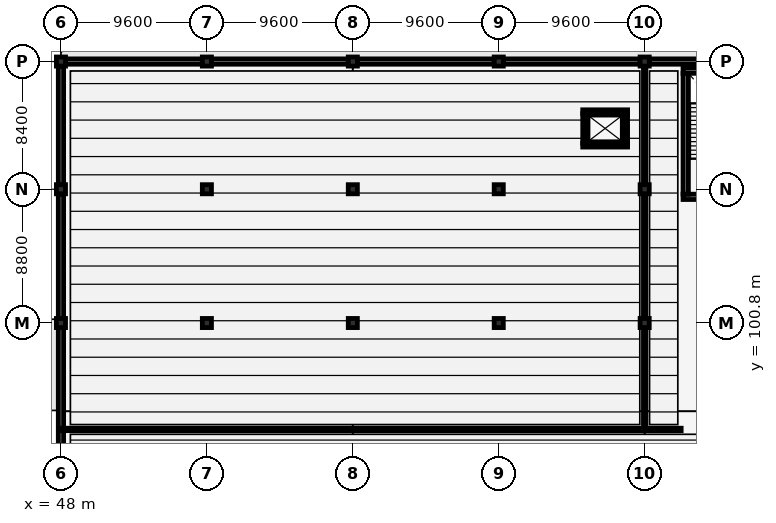
"""IFC4 building model, lengths in metres.
Left out: names, types, materials, properties, quantities, classifications, styles, units other than length and angle.
Written with IfcOpenShell. Run it as: python <this file> out.ifc"""

import sys

from ifc_helpers import new_model, si_unit, direction, frame, frame_2d, origin, origin_2d, place, context, subcontext, project, spatial, rectangle, extrude, element, fill, save


model = new_model("IFC4")
c1 = context("Model", 3, precision=1e-05, world=origin(), true_north=direction((0.0, 1.0)))
c2 = subcontext(c1, "Body", "Model", "MODEL_VIEW")
j1 = project(units=[si_unit("LENGTHUNIT", "METRE"), si_unit("PLANEANGLEUNIT", "RADIAN")], contexts=[c1])
p1 = place(None, origin())
s1 = spatial("IfcSite", under=j1, at=p1, CompositionType="ELEMENT")
p2 = place(p1, origin())
s2 = spatial("IfcBuilding", under=s1, at=p2, CompositionType="ELEMENT")
p3 = place(p2, origin())
s3 = spatial("IfcBuildingStorey", under=s2, at=p3, CompositionType="ELEMENT", Elevation=0.0)
for number, where, z_axis, x_axis in (
    (1, (48.0, 100.8, 0.0), (0.0, 0.0, 1.0), (1.0, 0.0, 0.0)),
    (2, (48.0, 109.6, 0.0), (0.0, 0.0, 1.0), (1.0, 0.0, 0.0)),
    (3, (48.0, 118.0, 0.0), (0.0, 0.0, 1.0), (1.0, 0.0, 0.0)),
    (4, (57.6, 100.8, 0.0), (0.0, 0.0, 1.0), (1.0, 0.0, 0.0)),
    (5, (57.6, 109.6, 0.0), (0.0, 0.0, 1.0), (1.0, 0.0, 0.0)),
    (6, (57.6, 118.0, 0.0), (0.0, 0.0, 1.0), (1.0, 0.0, 0.0)),
    (7, (67.2, 100.8, 0.0), (0.0, 0.0, 1.0), (1.0, 0.0, 0.0)),
    (8, (67.2, 109.6, 0.0), (0.0, 0.0, 1.0), (1.0, 0.0, 0.0)),
    (9, (67.2, 118.0, 0.0), (0.0, 0.0, 1.0), (1.0, 0.0, 0.0)),
    (10, (76.8, 100.8, 0.0), (0.0, 0.0, 1.0), (1.0, 0.0, 0.0)),
    (11, (76.8, 109.6, 0.0), (0.0, 0.0, 1.0), (1.0, 0.0, 0.0)),
    (12, (76.8, 118.0, 0.0), (0.0, 0.0, 1.0), (1.0, 0.0, 0.0)),
    (13, (86.4, 100.8, 0.0), (0.0, 0.0, 1.0), (1.0, 0.0, 0.0)),
    (14, (86.4, 109.6, 0.0), (0.0, 0.0, 1.0), (1.0, 0.0, 0.0)),
    (15, (86.4, 118.0, 0.0), (0.0, 0.0, 1.0), (1.0, 0.0, 0.0)),
):
    element("IfcColumn", number, at=place(p3, frame(where, z_axis=z_axis, x_axis=x_axis)), inside=s3, PredefinedType="COLUMN", context=c2, shape_type="SweptSolid", body=[
        extrude(rectangle(XDim=0.6, YDim=0.6, at=origin_2d()), origin(), (0.0, 0.0, 1.0), 4.8),
    ])
p4 = place(p3, frame((48.3, 118.0, 0.0), z_axis=(0.0, 0.0, 1.0), x_axis=(1.0, 0.0, 0.0)))
e16 = element("IfcWall", 16, at=p4, inside=s3, PredefinedType="SOLIDWALL", context=c2, shape_type="SweptSolid", body=[
    extrude(rectangle(XDim=9.0, YDim=0.35, at=frame_2d((4.5, 0.0))), origin(), (0.0, 0.0, 1.0), 4.1),
])
p5 = place(p4, frame((1.4, 0.0, 0.0)))
e17 = element("IfcOpeningElement", 17, at=p5, cuts=e16, PredefinedType="OPENING", context=c2, shape_type="SweptSolid", body=[
    extrude(rectangle(XDim=1.96, YDim=2.37, at=frame_2d((0.98, 1.185))), frame((0.0, 0.185, 0.0), z_axis=(0.0, -1.0, 0.0), x_axis=(1.0, 0.0, 0.0)), (0.0, 0.0, 1.0), 0.37),
])
p6 = place(p4, frame((5.4, 0.0, 1.1)))
e18 = element("IfcOpeningElement", 18, at=p6, cuts=e16, PredefinedType="OPENING", context=c2, shape_type="SweptSolid", body=[
    extrude(rectangle(XDim=1.5, YDim=1.6, at=frame_2d((0.75, 0.8))), frame((0.0, 0.185, 0.0), z_axis=(0.0, -1.0, 0.0), x_axis=(1.0, 0.0, 0.0)), (0.0, 0.0, 1.0), 0.37),
])
p7 = place(p3, frame((57.9, 118.0, 0.0), z_axis=(0.0, 0.0, 1.0), x_axis=(1.0, 0.0, 0.0)))
e19 = element("IfcWall", 19, at=p7, inside=s3, PredefinedType="SOLIDWALL", context=c2, shape_type="SweptSolid", body=[
    extrude(rectangle(XDim=9.0, YDim=0.35, at=frame_2d((4.5, 0.0))), origin(), (0.0, 0.0, 1.0), 4.1),
])
p8 = place(p7, frame((5.4, 0.0, 1.1)))
e20 = element("IfcOpeningElement", 20, at=p8, cuts=e19, PredefinedType="OPENING", context=c2, shape_type="SweptSolid", body=[
    extrude(rectangle(XDim=1.42, YDim=1.54, at=frame_2d((0.71, 0.77))), frame((0.0, 0.185, 0.0), z_axis=(0.0, -1.0, 0.0), x_axis=(1.0, 0.0, 0.0)), (0.0, 0.0, 1.0), 0.37),
])
p9 = place(p3, frame((67.5, 118.0, 0.0), z_axis=(0.0, 0.0, 1.0), x_axis=(1.0, 0.0, 0.0)))
e21 = element("IfcWall", 21, at=p9, inside=s3, PredefinedType="SOLIDWALL", context=c2, shape_type="SweptSolid", body=[
    extrude(rectangle(XDim=9.0, YDim=0.35, at=frame_2d((4.5, 0.0))), origin(), (0.0, 0.0, 1.0), 4.1),
])
p10 = place(p9, frame((1.4, 0.0, 0.0)))
e22 = element("IfcOpeningElement", 22, at=p10, cuts=e21, PredefinedType="OPENING", context=c2, shape_type="SweptSolid", body=[
    extrude(rectangle(XDim=1.88, YDim=2.31, at=frame_2d((0.94, 1.155))), frame((0.0, 0.185, 0.0), z_axis=(0.0, -1.0, 0.0), x_axis=(1.0, 0.0, 0.0)), (0.0, 0.0, 1.0), 0.37),
])
p11 = place(p9, frame((5.4, 0.0, 1.1)))
e23 = element("IfcOpeningElement", 23, at=p11, cuts=e21, PredefinedType="OPENING", context=c2, shape_type="SweptSolid", body=[
    extrude(rectangle(XDim=1.5, YDim=1.6, at=frame_2d((0.75, 0.8))), frame((0.0, 0.185, 0.0), z_axis=(0.0, -1.0, 0.0), x_axis=(1.0, 0.0, 0.0)), (0.0, 0.0, 1.0), 0.37),
])
p12 = place(p3, frame((77.1, 118.0, 0.0), z_axis=(0.0, 0.0, 1.0), x_axis=(1.0, 0.0, 0.0)))
e24 = element("IfcWall", 24, at=p12, inside=s3, PredefinedType="SOLIDWALL", context=c2, shape_type="SweptSolid", body=[
    extrude(rectangle(XDim=9.0, YDim=0.35, at=frame_2d((4.5, 0.0))), origin(), (0.0, 0.0, 1.0), 4.1),
])
p13 = place(p12, frame((5.4, 0.0, 1.1)))
e25 = element("IfcOpeningElement", 25, at=p13, cuts=e24, PredefinedType="OPENING", context=c2, shape_type="SweptSolid", body=[
    extrude(rectangle(XDim=1.42, YDim=1.54, at=frame_2d((0.71, 0.77))), frame((0.0, 0.185, 0.0), z_axis=(0.0, -1.0, 0.0), x_axis=(1.0, 0.0, 0.0)), (0.0, 0.0, 1.0), 0.37),
])
p14 = place(p3, frame((86.7, 118.0, 0.0), z_axis=(0.0, 0.0, 1.0), x_axis=(1.0, 0.0, 0.0)))
e26 = element("IfcWall", 26, at=p14, inside=s3, PredefinedType="SOLIDWALL", context=c2, shape_type="SweptSolid", body=[
    extrude(rectangle(XDim=9.0, YDim=0.35, at=frame_2d((4.5, 0.0))), origin(), (0.0, 0.0, 1.0), 4.1),
])
p15 = place(p14, frame((0.7, 0.0, 0.0)))
e27 = element("IfcOpeningElement", 27, at=p15, cuts=e26, PredefinedType="OPENING", context=c2, shape_type="SweptSolid", body=[
    extrude(rectangle(XDim=1.0, YDim=2.2, at=frame_2d((0.5, 1.1))), frame((0.0, 0.185, 0.0), z_axis=(0.0, -1.0, 0.0), x_axis=(1.0, 0.0, 0.0)), (0.0, 0.0, 1.0), 0.37),
])
p16 = place(p14, frame((5.4, 0.0, 1.1)))
e28 = element("IfcOpeningElement", 28, at=p16, cuts=e26, PredefinedType="OPENING", context=c2, shape_type="SweptSolid", body=[
    extrude(rectangle(XDim=1.5, YDim=1.6, at=frame_2d((0.75, 0.8))), frame((0.0, 0.185, 0.0), z_axis=(0.0, -1.0, 0.0), x_axis=(1.0, 0.0, 0.0)), (0.0, 0.0, 1.0), 0.37),
])
p17 = place(p3, frame((48.0, 91.5, 0.0), z_axis=(0.0, 0.0, 1.0), x_axis=(0.0, 1.0, 0.0)))
e29 = element("IfcWall", 29, at=p17, inside=s3, PredefinedType="SOLIDWALL", context=c2, shape_type="SweptSolid", body=[
    extrude(rectangle(XDim=9.0, YDim=0.35, at=frame_2d((4.5, 0.0))), origin(), (0.0, 0.0, 1.0), 4.1),
])
p18 = place(p17, frame((4.3, 0.0, 0.0)))
e30 = element("IfcOpeningElement", 30, at=p18, cuts=e29, PredefinedType="OPENING", context=c2, shape_type="SweptSolid", body=[
    extrude(rectangle(XDim=1.76, YDim=2.37, at=frame_2d((0.88, 1.185))), frame((0.0, 0.185, 0.0), z_axis=(0.0, -1.0, 0.0), x_axis=(1.0, 0.0, 0.0)), (0.0, 0.0, 1.0), 0.37),
])
p19 = place(p3, frame((48.0, 101.1, 0.0), z_axis=(0.0, 0.0, 1.0), x_axis=(0.0, 1.0, 0.0)))
e31 = element("IfcWall", 31, at=p19, inside=s3, PredefinedType="SOLIDWALL", context=c2, shape_type="SweptSolid", body=[
    extrude(rectangle(XDim=8.2, YDim=0.35, at=frame_2d((4.1, 0.0))), origin(), (0.0, 0.0, 1.0), 4.1),
])
p20 = place(p19, frame((2.8, 0.0, 1.15)))
e32 = element("IfcOpeningElement", 32, at=p20, cuts=e31, PredefinedType="OPENING", context=c2, shape_type="SweptSolid", body=[
    extrude(rectangle(XDim=1.38, YDim=1.51, at=frame_2d((0.69, 0.755))), frame((0.0, 0.185, 0.0), z_axis=(0.0, -1.0, 0.0), x_axis=(1.0, 0.0, 0.0)), (0.0, 0.0, 1.0), 0.37),
])
p21 = place(p3, frame((48.0, 109.9, 0.0), z_axis=(0.0, 0.0, 1.0), x_axis=(0.0, 1.0, 0.0)))
e33 = element("IfcWall", 33, at=p21, inside=s3, PredefinedType="SOLIDWALL", context=c2, shape_type="SweptSolid", body=[
    extrude(rectangle(XDim=7.8, YDim=0.35, at=frame_2d((3.9, 0.0))), origin(), (0.0, 0.0, 1.0), 4.1),
])
p22 = place(p21, frame((2.8, 0.0, 1.15)))
e34 = element("IfcOpeningElement", 34, at=p22, cuts=e33, PredefinedType="OPENING", context=c2, shape_type="SweptSolid", body=[
    extrude(rectangle(XDim=1.46, YDim=1.57, at=frame_2d((0.73, 0.785))), frame((0.0, 0.185, 0.0), z_axis=(0.0, -1.0, 0.0), x_axis=(1.0, 0.0, 0.0)), (0.0, 0.0, 1.0), 0.37),
])
p23 = place(p2, frame((0.0, 0.0, -4.2)))
s4 = spatial("IfcBuildingStorey", under=s2, at=p23, CompositionType="ELEMENT", Elevation=-4.2)
p24 = place(p23, frame((38.575, 95.0, 0.0), z_axis=(0.0, 0.0, 1.0), x_axis=(1.0, 0.0, 0.0)))
e35 = element("IfcWall", 35, at=p24, inside=s4, PredefinedType="SOLIDWALL", context=c2, shape_type="SweptSolid", body=[
    extrude(rectangle(XDim=9.25, YDim=0.4, at=frame_2d((4.625, 0.0))), origin(), (0.0, 0.0, 1.0), 9.0),
])
for number, where, z_axis, x_axis in (
    (36, (94.575, 109.1, 0.0), (0.0, 0.0, 1.0), (-1.0, 0.0, 0.0)),
    (37, (88.925, 117.4, 0.0), (0.0, 0.0, 1.0), (1.0, 0.0, 0.0)),
):
    element("IfcWall", number, at=place(p3, frame(where, z_axis=z_axis, x_axis=x_axis)), inside=s3, PredefinedType="SHEAR", context=c2, shape_type="SweptSolid", body=[
        extrude(rectangle(XDim=5.65, YDim=0.35, at=frame_2d((2.825, 0.0))), origin(), (0.0, 0.0, 1.0), 4.55),
    ])
p25 = place(p3, frame((89.1, 109.275, 0.0), z_axis=(0.0, 0.0, 1.0), x_axis=(0.0, 1.0, 0.0)))
e38 = element("IfcWall", 38, at=p25, inside=s3, PredefinedType="SHEAR", context=c2, shape_type="SweptSolid", body=[
    extrude(rectangle(XDim=7.95, YDim=0.35, at=frame_2d((3.975, 0.0))), origin(), (0.0, 0.0, 1.0), 4.55),
])
p26 = place(p25, frame((0.22, 0.0, 0.0)))
e39 = element("IfcOpeningElement", 39, at=p26, cuts=e38, PredefinedType="OPENING", context=c2, shape_type="SweptSolid", body=[
    extrude(rectangle(XDim=2.05, YDim=2.15, at=frame_2d((1.025, 1.075))), frame((0.0, 0.185, 0.0), z_axis=(0.0, -1.0, 0.0), x_axis=(1.0, 0.0, 0.0)), (0.0, 0.0, 1.0), 0.37),
])
p27 = place(p3, frame((85.275, 112.5, 0.0), z_axis=(0.0, 0.0, 1.0), x_axis=(-1.0, 0.0, 0.0)))
e40 = element("IfcWall", 40, at=p27, inside=s3, PredefinedType="SOLIDWALL", context=c2, shape_type="SweptSolid", body=[
    extrude(rectangle(XDim=2.95, YDim=0.25, at=frame_2d((1.475, 0.0))), origin(), (0.0, 0.0, 1.0), 4.55),
])
p28 = place(p27, frame((0.925, 0.0, 0.0)))
e41 = element("IfcOpeningElement", 41, at=p28, cuts=e40, PredefinedType="OPENING", context=c2, shape_type="SweptSolid", body=[
    extrude(rectangle(XDim=1.1, YDim=2.15, at=frame_2d((0.55, 1.075))), frame((0.0, 0.135, 0.0), z_axis=(0.0, -1.0, 0.0), x_axis=(1.0, 0.0, 0.0)), (0.0, 0.0, 1.0), 0.27),
])
p29 = place(p3, frame((82.325, 114.7, 0.0), z_axis=(0.0, 0.0, 1.0), x_axis=(1.0, 0.0, 0.0)))
e42 = element("IfcWall", 42, at=p29, inside=s3, PredefinedType="SOLIDWALL", context=c2, shape_type="SweptSolid", body=[
    extrude(rectangle(XDim=2.95, YDim=0.25, at=frame_2d((1.475, 0.0))), origin(), (0.0, 0.0, 1.0), 4.55),
])
for number, where, z_axis, x_axis in (
    (43, (82.45, 112.625, 0.0), (0.0, 0.0, 1.0), (0.0, 1.0, 0.0)),
    (44, (85.15, 114.575, 0.0), (0.0, 0.0, 1.0), (0.0, -1.0, 0.0)),
):
    element("IfcWall", number, at=place(p3, frame(where, z_axis=z_axis, x_axis=x_axis)), inside=s3, PredefinedType="SOLIDWALL", context=c2, shape_type="SweptSolid", body=[
        extrude(rectangle(XDim=1.95, YDim=0.25, at=frame_2d((0.975, 0.0))), origin(), (0.0, 0.0, 1.0), 4.55),
    ])
p30 = place(p3, frame((86.5, 93.8, 0.0), z_axis=(0.0, 0.0, 1.0), x_axis=(1.0, 0.0, 0.0)))
e45 = element("IfcWall", 45, at=p30, inside=s3, PredefinedType="PARTITIONING", context=c2, shape_type="SweptSolid", body=[
    extrude(rectangle(XDim=2.3, YDim=0.16, at=frame_2d((1.15, 0.0))), origin(), (0.0, 0.0, 1.0), 4.42),
])
p31 = place(p30, frame((0.25, 0.0, 0.0)))
e46 = element("IfcOpeningElement", 46, at=p31, cuts=e45, PredefinedType="OPENING", context=c2, shape_type="SweptSolid", body=[
    extrude(rectangle(XDim=1.8, YDim=2.15, at=frame_2d((0.9, 1.075))), frame((0.0, 0.09, 0.0), z_axis=(0.0, -1.0, 0.0), x_axis=(1.0, 0.0, 0.0)), (0.0, 0.0, 1.0), 0.18),
])
p32 = place(p3, frame((48.05, 93.8, 0.0), z_axis=(0.0, 0.0, 1.0), x_axis=(1.0, 0.0, 0.0)))
e47 = element("IfcWall", 47, at=p32, inside=s3, PredefinedType="PARTITIONING", context=c2, shape_type="SweptSolid", body=[
    extrude(rectangle(XDim=38.25, YDim=0.16, at=frame_2d((19.125, 0.0))), origin(), (0.0, 0.0, 1.0), 4.42),
])
p33 = place(p32, frame((18.615, 0.0, 0.0)))
e48 = element("IfcOpeningElement", 48, at=p33, cuts=e47, PredefinedType="OPENING", context=c2, shape_type="SweptSolid", body=[
    extrude(rectangle(XDim=1.02, YDim=2.16, at=frame_2d((0.51, 1.08))), frame((0.0, 0.09, 0.0), z_axis=(0.0, -1.0, 0.0), x_axis=(1.0, 0.0, 0.0)), (0.0, 0.0, 1.0), 0.18),
])
p34 = place(p3, frame((86.4, 93.9, 0.0), z_axis=(0.0, 0.0, 1.0), x_axis=(0.0, 1.0, 0.0)))
e49 = element("IfcWall", 49, at=p34, inside=s3, PredefinedType="PARTITIONING", context=c2, shape_type="SweptSolid", body=[
    extrude(rectangle(XDim=24.05, YDim=0.16, at=frame_2d((12.025, 0.0))), origin(), (0.0, 0.0, 1.0), 3.92),
])
p35 = place(p34, frame((11.515, 0.0, 0.0)))
e50 = element("IfcOpeningElement", 50, at=p35, cuts=e49, PredefinedType="OPENING", context=c2, shape_type="SweptSolid", body=[
    extrude(rectangle(XDim=1.02, YDim=2.16, at=frame_2d((0.51, 1.08))), frame((0.0, 0.09, 0.0), z_axis=(0.0, -1.0, 0.0), x_axis=(1.0, 0.0, 0.0)), (0.0, 0.0, 1.0), 0.18),
])
p36 = place(p5, origin())
e51 = element("IfcDoor", 51, at=p36, inside=s3, OperationType="DOUBLE_DOOR_SINGLE_SWING", PredefinedType="DOOR", context=c2, shape_type="SweptSolid", body=[
    extrude(rectangle(XDim=1.96, YDim=2.37, at=frame_2d((0.98, 1.185))), frame((0.0, 0.025, 0.0), z_axis=(0.0, -1.0, 0.0), x_axis=(1.0, 0.0, 0.0)), (0.0, 0.0, 1.0), 0.05),
])
fill(e17, e51)
p37 = place(p6, origin())
e52 = element("IfcWindow", 52, at=p37, inside=s3, PartitioningType="SINGLE_PANEL", PredefinedType="WINDOW", context=c2, shape_type="SweptSolid", body=[
    extrude(rectangle(XDim=1.5, YDim=1.6, at=frame_2d((0.75, 0.8))), frame((0.0, 0.03, 0.0), z_axis=(0.0, -1.0, 0.0), x_axis=(1.0, 0.0, 0.0)), (0.0, 0.0, 1.0), 0.06),
])
fill(e18, e52)
p38 = place(p8, origin())
e53 = element("IfcWindow", 53, at=p38, inside=s3, PartitioningType="SINGLE_PANEL", PredefinedType="WINDOW", context=c2, shape_type="SweptSolid", body=[
    extrude(rectangle(XDim=1.42, YDim=1.54, at=frame_2d((0.71, 0.77))), frame((0.0, 0.03, 0.0), z_axis=(0.0, -1.0, 0.0), x_axis=(1.0, 0.0, 0.0)), (0.0, 0.0, 1.0), 0.06),
])
fill(e20, e53)
p39 = place(p10, origin())
e54 = element("IfcDoor", 54, at=p39, inside=s3, OperationType="DOUBLE_DOOR_SINGLE_SWING", PredefinedType="DOOR", context=c2, shape_type="SweptSolid", body=[
    extrude(rectangle(XDim=1.88, YDim=2.31, at=frame_2d((0.94, 1.155))), frame((0.0, 0.025, 0.0), z_axis=(0.0, -1.0, 0.0), x_axis=(1.0, 0.0, 0.0)), (0.0, 0.0, 1.0), 0.05),
])
fill(e22, e54)
p40 = place(p11, origin())
e55 = element("IfcWindow", 55, at=p40, inside=s3, PartitioningType="SINGLE_PANEL", PredefinedType="WINDOW", context=c2, shape_type="SweptSolid", body=[
    extrude(rectangle(XDim=1.5, YDim=1.6, at=frame_2d((0.75, 0.8))), frame((0.0, 0.03, 0.0), z_axis=(0.0, -1.0, 0.0), x_axis=(1.0, 0.0, 0.0)), (0.0, 0.0, 1.0), 0.06),
])
fill(e23, e55)
p41 = place(p13, origin())
e56 = element("IfcWindow", 56, at=p41, inside=s3, PartitioningType="SINGLE_PANEL", PredefinedType="WINDOW", context=c2, shape_type="SweptSolid", body=[
    extrude(rectangle(XDim=1.42, YDim=1.54, at=frame_2d((0.71, 0.77))), frame((0.0, 0.03, 0.0), z_axis=(0.0, -1.0, 0.0), x_axis=(1.0, 0.0, 0.0)), (0.0, 0.0, 1.0), 0.06),
])
fill(e25, e56)
p42 = place(p15, origin())
e57 = element("IfcDoor", 57, at=p42, inside=s3, OperationType="SINGLE_SWING_LEFT", PredefinedType="DOOR", context=c2, shape_type="SweptSolid", body=[
    extrude(rectangle(XDim=1.0, YDim=2.2, at=frame_2d((0.5, 1.1))), frame((0.0, 0.025, 0.0), z_axis=(0.0, -1.0, 0.0), x_axis=(1.0, 0.0, 0.0)), (0.0, 0.0, 1.0), 0.05),
])
fill(e27, e57)
p43 = place(p18, origin())
e58 = element("IfcDoor", 58, at=p43, inside=s3, OperationType="DOUBLE_DOOR_SINGLE_SWING", PredefinedType="DOOR", context=c2, shape_type="SweptSolid", body=[
    extrude(rectangle(XDim=1.76, YDim=2.37, at=frame_2d((0.88, 1.185))), frame((0.0, 0.025, 0.0), z_axis=(0.0, -1.0, 0.0), x_axis=(1.0, 0.0, 0.0)), (0.0, 0.0, 1.0), 0.05),
])
fill(e30, e58)
p44 = place(p20, origin())
e59 = element("IfcWindow", 59, at=p44, inside=s3, PartitioningType="SINGLE_PANEL", PredefinedType="WINDOW", context=c2, shape_type="SweptSolid", body=[
    extrude(rectangle(XDim=1.38, YDim=1.51, at=frame_2d((0.69, 0.755))), frame((0.0, 0.03, 0.0), z_axis=(0.0, -1.0, 0.0), x_axis=(1.0, 0.0, 0.0)), (0.0, 0.0, 1.0), 0.06),
])
fill(e32, e59)
p45 = place(p22, origin())
e60 = element("IfcWindow", 60, at=p45, inside=s3, PartitioningType="SINGLE_PANEL", PredefinedType="WINDOW", context=c2, shape_type="SweptSolid", body=[
    extrude(rectangle(XDim=1.46, YDim=1.57, at=frame_2d((0.73, 0.785))), frame((0.0, 0.03, 0.0), z_axis=(0.0, -1.0, 0.0), x_axis=(1.0, 0.0, 0.0)), (0.0, 0.0, 1.0), 0.06),
])
fill(e34, e60)
p46 = place(p26, origin())
e61 = element("IfcDoor", 61, at=p46, inside=s3, OperationType="DOUBLE_DOOR_SINGLE_SWING", PredefinedType="DOOR", context=c2, shape_type="SweptSolid", body=[
    extrude(rectangle(XDim=2.05, YDim=2.15, at=frame_2d((1.025, 1.075))), frame((0.0, 0.025, 0.0), z_axis=(0.0, -1.0, 0.0), x_axis=(1.0, 0.0, 0.0)), (0.0, 0.0, 1.0), 0.05),
])
fill(e39, e61)
p47 = place(p28, origin())
e62 = element("IfcDoor", 62, at=p47, inside=s3, OperationType="DOUBLE_DOOR_SLIDING", PredefinedType="DOOR", context=c2, shape_type="SweptSolid", body=[
    extrude(rectangle(XDim=1.1, YDim=2.15, at=frame_2d((0.55, 1.075))), frame((0.0, 0.025, 0.0), z_axis=(0.0, -1.0, 0.0), x_axis=(1.0, 0.0, 0.0)), (0.0, 0.0, 1.0), 0.05),
])
fill(e41, e62)
p48 = place(p31, origin())
e63 = element("IfcDoor", 63, at=p48, inside=s3, OperationType="DOUBLE_DOOR_SINGLE_SWING", PredefinedType="DOOR", context=c2, shape_type="SweptSolid", body=[
    extrude(rectangle(XDim=1.8, YDim=2.15, at=frame_2d((0.9, 1.075))), frame((0.0, 0.025, 0.0), z_axis=(0.0, -1.0, 0.0), x_axis=(1.0, 0.0, 0.0)), (0.0, 0.0, 1.0), 0.05),
])
fill(e46, e63)
p49 = place(p33, origin())
e64 = element("IfcDoor", 64, at=p49, inside=s3, OperationType="SINGLE_SWING_LEFT", PredefinedType="DOOR", context=c2, shape_type="SweptSolid", body=[
    extrude(rectangle(XDim=1.02, YDim=2.16, at=frame_2d((0.51, 1.08))), frame((0.0, 0.025, 0.0), z_axis=(0.0, -1.0, 0.0), x_axis=(1.0, 0.0, 0.0)), (0.0, 0.0, 1.0), 0.05),
])
fill(e48, e64)
p50 = place(p35, origin())
e65 = element("IfcDoor", 65, at=p50, inside=s3, OperationType="SINGLE_SWING_LEFT", PredefinedType="DOOR", context=c2, shape_type="SweptSolid", body=[
    extrude(rectangle(XDim=1.02, YDim=2.16, at=frame_2d((0.51, 1.08))), frame((0.0, 0.025, 0.0), z_axis=(0.0, -1.0, 0.0), x_axis=(1.0, 0.0, 0.0)), (0.0, 0.0, 1.0), 0.05),
])
fill(e50, e65)
save(model, sys.argv[1])
